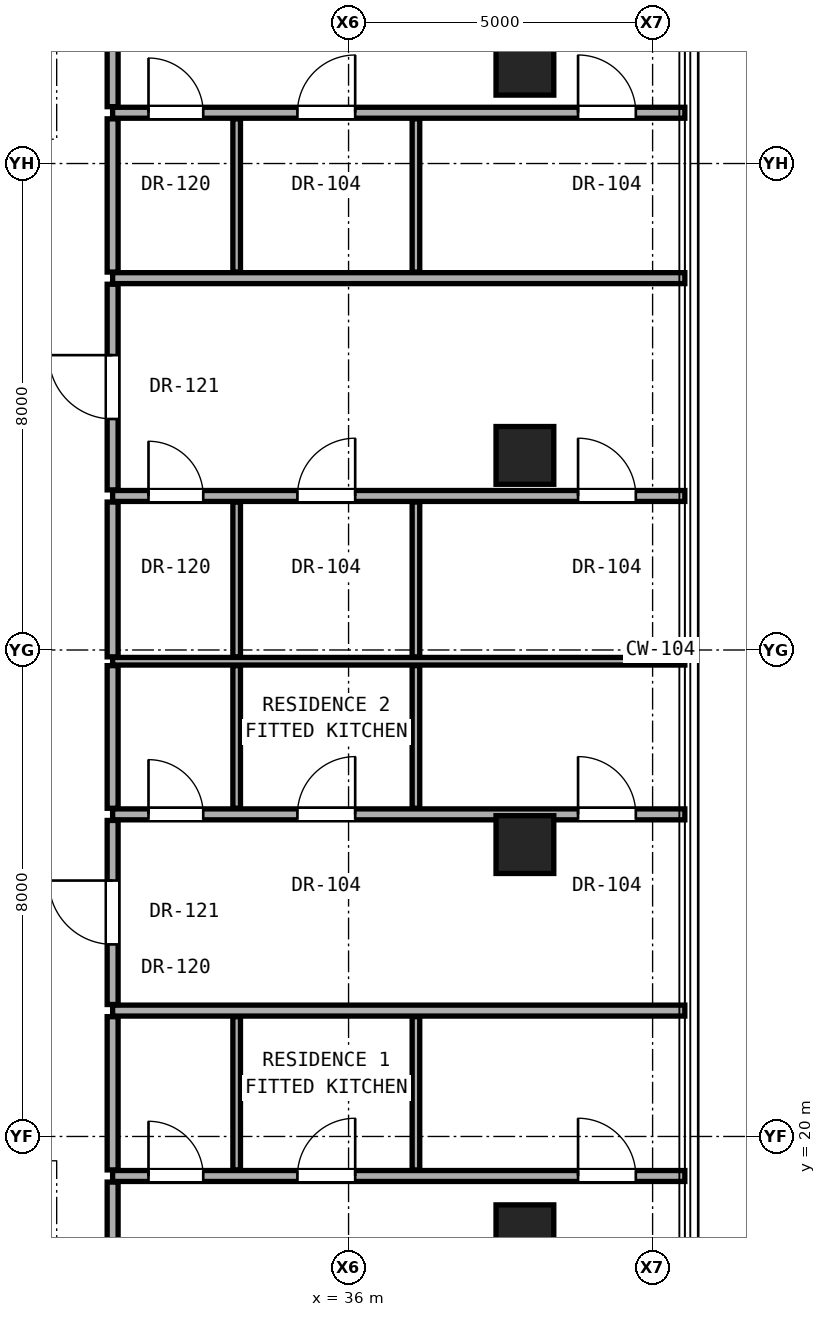
"""IFC4 building model, lengths in metres.
Left out: names, types, materials, properties, quantities, classifications, styles, units other than length and angle.
Written with IfcOpenShell. Run it as: python <this file> out.ifc"""

import sys

from ifc_helpers import new_model, si_unit, direction, frame, frame_2d, origin, origin_2d, place, context, subcontext, project, spatial, rectangle, hollow_rectangle, extrude, element, fill, save


model = new_model("IFC4")
c1 = context("Model", 3, precision=1e-05, world=origin(), true_north=direction((0.0, 1.0)))
c2 = subcontext(c1, "Body", "Model", "MODEL_VIEW")
j1 = project(units=[si_unit("LENGTHUNIT", "METRE"), si_unit("PLANEANGLEUNIT", "RADIAN")], contexts=[c1])
p1 = place(None, origin())
s1 = spatial("IfcSite", under=j1, at=p1, CompositionType="ELEMENT")
p2 = place(p1, origin())
s2 = spatial("IfcBuilding", under=s1, at=p2, CompositionType="ELEMENT")
p3 = place(p2, frame((0.0, 0.0, 170.65)))
s3 = spatial("IfcBuildingStorey", under=s2, at=p3, CompositionType="ELEMENT", Elevation=170.65)
for number, where, z_axis, x_axis in (
    (1, (38.9, 18.4, 0.0), (0.0, 0.0, 1.0), (1.0, 0.0, 0.0)),
    (2, (38.9, 24.8, 0.0), (0.0, 0.0, 1.0), (1.0, 0.0, 0.0)),
    (3, (38.9, 31.2, 0.0), (0.0, 0.0, 1.0), (1.0, 0.0, 0.0)),
    (4, (38.9, 37.6, 0.0), (0.0, 0.0, 1.0), (1.0, 0.0, 0.0)),
):
    element("IfcColumn", number, at=place(p3, frame(where, z_axis=z_axis, x_axis=x_axis)), inside=s3, PredefinedType="COLUMN", context=c2, shape_type="SweptSolid", body=[
        extrude(hollow_rectangle(XDim=0.95, YDim=0.95, WallThickness=0.05, at=origin_2d()), origin(), (0.0, 0.0, 1.0), 3.25),
    ])
p4 = place(p3, frame((32.12, 19.35, 0.0), z_axis=(0.0, 0.0, 1.0), x_axis=(1.0, 0.0, 0.0)))
e5 = element("IfcWall", 5, at=p4, inside=s3, PredefinedType="PARTITIONING", context=c2, shape_type="SweptSolid", body=[
    extrude(rectangle(XDim=9.41, YDim=0.18, at=frame_2d((4.705, 0.0))), origin(), (0.0, 0.0, 1.0), 2.269),
])
p5 = place(p4, frame((7.654, 0.0, 0.0)))
e6 = element("IfcOpeningElement", 6, at=p5, cuts=e5, PredefinedType="OPENING", context=c2, shape_type="SweptSolid", body=[
    extrude(rectangle(XDim=0.95, YDim=2.15, at=frame_2d((0.475, 1.075))), frame((0.0, 0.1, 0.0), z_axis=(0.0, -1.0, 0.0), x_axis=(1.0, 0.0, 0.0)), (0.0, 0.0, 1.0), 0.2),
])
p6 = place(p4, frame((3.039, 0.0, 0.0)))
e7 = element("IfcOpeningElement", 7, at=p6, cuts=e5, PredefinedType="OPENING", context=c2, shape_type="SweptSolid", body=[
    extrude(rectangle(XDim=0.95, YDim=2.15, at=frame_2d((0.475, 1.075))), frame((0.0, 0.1, 0.0), z_axis=(0.0, -1.0, 0.0), x_axis=(1.0, 0.0, 0.0)), (0.0, 0.0, 1.0), 0.2),
])
p7 = place(p4, frame((0.59, 0.0, 0.0)))
e8 = element("IfcOpeningElement", 8, at=p7, cuts=e5, PredefinedType="OPENING", context=c2, shape_type="SweptSolid", body=[
    extrude(rectangle(XDim=0.9, YDim=2.1, at=frame_2d((0.45, 1.05))), frame((0.0, 0.1, 0.0), z_axis=(0.0, -1.0, 0.0), x_axis=(1.0, 0.0, 0.0)), (0.0, 0.0, 1.0), 0.2),
])
p8 = place(p3, frame((32.12, 22.07, 0.0), z_axis=(0.0, 0.0, 1.0), x_axis=(1.0, 0.0, 0.0)))
e9 = element("IfcWall", 9, at=p8, inside=s3, PredefinedType="PARTITIONING", context=c2, shape_type="SweptSolid", body=[
    extrude(rectangle(XDim=9.41, YDim=0.18, at=frame_2d((4.705, 0.0))), origin(), (0.0, 0.0, 1.0), 2.269),
])
p9 = place(p3, frame((32.12, 25.297, 0.0), z_axis=(0.0, 0.0, 1.0), x_axis=(1.0, 0.0, 0.0)))
e10 = element("IfcWall", 10, at=p9, inside=s3, PredefinedType="PARTITIONING", context=c2, shape_type="SweptSolid", body=[
    extrude(rectangle(XDim=9.41, YDim=0.18, at=frame_2d((4.705, 0.0))), origin(), (0.0, 0.0, 1.0), 2.269),
])
p10 = place(p9, frame((7.654, 0.0, 0.0)))
e11 = element("IfcOpeningElement", 11, at=p10, cuts=e10, PredefinedType="OPENING", context=c2, shape_type="SweptSolid", body=[
    extrude(rectangle(XDim=0.95, YDim=2.15, at=frame_2d((0.475, 1.075))), frame((0.0, 0.1, 0.0), z_axis=(0.0, -1.0, 0.0), x_axis=(1.0, 0.0, 0.0)), (0.0, 0.0, 1.0), 0.2),
])
p11 = place(p9, frame((3.039, 0.0, 0.0)))
e12 = element("IfcOpeningElement", 12, at=p11, cuts=e10, PredefinedType="OPENING", context=c2, shape_type="SweptSolid", body=[
    extrude(rectangle(XDim=0.95, YDim=2.15, at=frame_2d((0.475, 1.075))), frame((0.0, 0.1, 0.0), z_axis=(0.0, -1.0, 0.0), x_axis=(1.0, 0.0, 0.0)), (0.0, 0.0, 1.0), 0.2),
])
p12 = place(p9, frame((0.59, 0.0, 0.0)))
e13 = element("IfcOpeningElement", 13, at=p12, cuts=e10, PredefinedType="OPENING", context=c2, shape_type="SweptSolid", body=[
    extrude(rectangle(XDim=0.9, YDim=2.1, at=frame_2d((0.45, 1.05))), frame((0.0, 0.1, 0.0), z_axis=(0.0, -1.0, 0.0), x_axis=(1.0, 0.0, 0.0)), (0.0, 0.0, 1.0), 0.2),
])
p13 = place(p3, frame((32.12, 27.815, 0.0), z_axis=(0.0, 0.0, 1.0), x_axis=(1.0, 0.0, 0.0)))
e14 = element("IfcWall", 14, at=p13, inside=s3, PredefinedType="PARTITIONING", context=c2, shape_type="SweptSolid", body=[
    extrude(rectangle(XDim=9.41, YDim=0.125, at=frame_2d((4.705, 0.0))), origin(), (0.0, 0.0, 1.0), 2.269),
])
p14 = place(p3, frame((32.12, 30.533, 0.0), z_axis=(0.0, 0.0, 1.0), x_axis=(1.0, 0.0, 0.0)))
e15 = element("IfcWall", 15, at=p14, inside=s3, PredefinedType="PARTITIONING", context=c2, shape_type="SweptSolid", body=[
    extrude(rectangle(XDim=9.41, YDim=0.18, at=frame_2d((4.705, 0.0))), origin(), (0.0, 0.0, 1.0), 2.269),
])
p15 = place(p14, frame((7.654, 0.0, 0.0)))
e16 = element("IfcOpeningElement", 16, at=p15, cuts=e15, PredefinedType="OPENING", context=c2, shape_type="SweptSolid", body=[
    extrude(rectangle(XDim=0.95, YDim=2.15, at=frame_2d((0.475, 1.075))), frame((0.0, 0.1, 0.0), z_axis=(0.0, -1.0, 0.0), x_axis=(1.0, 0.0, 0.0)), (0.0, 0.0, 1.0), 0.2),
])
p16 = place(p14, frame((3.039, 0.0, 0.0)))
e17 = element("IfcOpeningElement", 17, at=p16, cuts=e15, PredefinedType="OPENING", context=c2, shape_type="SweptSolid", body=[
    extrude(rectangle(XDim=0.95, YDim=2.15, at=frame_2d((0.475, 1.075))), frame((0.0, 0.1, 0.0), z_axis=(0.0, -1.0, 0.0), x_axis=(1.0, 0.0, 0.0)), (0.0, 0.0, 1.0), 0.2),
])
p17 = place(p14, frame((0.59, 0.0, 0.0)))
e18 = element("IfcOpeningElement", 18, at=p17, cuts=e15, PredefinedType="OPENING", context=c2, shape_type="SweptSolid", body=[
    extrude(rectangle(XDim=0.9, YDim=2.1, at=frame_2d((0.45, 1.05))), frame((0.0, 0.1, 0.0), z_axis=(0.0, -1.0, 0.0), x_axis=(1.0, 0.0, 0.0)), (0.0, 0.0, 1.0), 0.2),
])
p18 = place(p3, frame((32.12, 34.115, 0.0), z_axis=(0.0, 0.0, 1.0), x_axis=(1.0, 0.0, 0.0)))
e19 = element("IfcWall", 19, at=p18, inside=s3, PredefinedType="PARTITIONING", context=c2, shape_type="SweptSolid", body=[
    extrude(rectangle(XDim=9.41, YDim=0.18, at=frame_2d((4.705, 0.0))), origin(), (0.0, 0.0, 1.0), 2.269),
])
p19 = place(p3, frame((32.12, 36.835, 0.0), z_axis=(0.0, 0.0, 1.0), x_axis=(1.0, 0.0, 0.0)))
e20 = element("IfcWall", 20, at=p19, inside=s3, PredefinedType="PARTITIONING", context=c2, shape_type="SweptSolid", body=[
    extrude(rectangle(XDim=9.41, YDim=0.18, at=frame_2d((4.705, 0.0))), origin(), (0.0, 0.0, 1.0), 2.269),
])
p20 = place(p19, frame((7.654, 0.0, 0.0)))
e21 = element("IfcOpeningElement", 21, at=p20, cuts=e20, PredefinedType="OPENING", context=c2, shape_type="SweptSolid", body=[
    extrude(rectangle(XDim=0.95, YDim=2.15, at=frame_2d((0.475, 1.075))), frame((0.0, 0.1, 0.0), z_axis=(0.0, -1.0, 0.0), x_axis=(1.0, 0.0, 0.0)), (0.0, 0.0, 1.0), 0.2),
])
p21 = place(p19, frame((3.039, 0.0, 0.0)))
e22 = element("IfcOpeningElement", 22, at=p21, cuts=e20, PredefinedType="OPENING", context=c2, shape_type="SweptSolid", body=[
    extrude(rectangle(XDim=0.95, YDim=2.15, at=frame_2d((0.475, 1.075))), frame((0.0, 0.1, 0.0), z_axis=(0.0, -1.0, 0.0), x_axis=(1.0, 0.0, 0.0)), (0.0, 0.0, 1.0), 0.2),
])
p22 = place(p19, frame((0.59, 0.0, 0.0)))
e23 = element("IfcOpeningElement", 23, at=p22, cuts=e20, PredefinedType="OPENING", context=c2, shape_type="SweptSolid", body=[
    extrude(rectangle(XDim=0.9, YDim=2.1, at=frame_2d((0.45, 1.05))), frame((0.0, 0.1, 0.0), z_axis=(0.0, -1.0, 0.0), x_axis=(1.0, 0.0, 0.0)), (0.0, 0.0, 1.0), 0.2),
])
p23 = place(p3, frame((32.12, 14.685, 0.0), z_axis=(0.0, 0.0, 1.0), x_axis=(0.0, 1.0, 0.0)))
e24 = element("IfcWall", 24, at=p23, inside=s3, PredefinedType="PARTITIONING", context=c2, shape_type="SweptSolid", body=[
    extrude(rectangle(XDim=4.565, YDim=0.18, at=frame_2d((2.282, 0.0))), origin(), (0.0, 0.0, 1.0), 2.442),
])
p24 = place(p23, frame((2.058, 0.0, 0.0)))
e25 = element("IfcOpeningElement", 25, at=p24, cuts=e24, PredefinedType="OPENING", context=c2, shape_type="SweptSolid", body=[
    extrude(rectangle(XDim=1.05, YDim=2.2, at=frame_2d((0.525, 1.1))), frame((0.0, 0.1, 0.0), z_axis=(0.0, -1.0, 0.0), x_axis=(1.0, 0.0, 0.0)), (0.0, 0.0, 1.0), 0.2),
])
p25 = place(p3, frame((32.12, 19.45, 0.0), z_axis=(0.0, 0.0, 1.0), x_axis=(0.0, 1.0, 0.0)))
e26 = element("IfcWall", 26, at=p25, inside=s3, PredefinedType="PARTITIONING", context=c2, shape_type="SweptSolid", body=[
    extrude(rectangle(XDim=2.52, YDim=0.18, at=frame_2d((1.26, 0.0))), origin(), (0.0, 0.0, 1.0), 3.05),
])
p26 = place(p3, frame((32.12, 22.17, 0.0), z_axis=(0.0, 0.0, 1.0), x_axis=(0.0, 1.0, 0.0)))
e27 = element("IfcWall", 27, at=p26, inside=s3, PredefinedType="PARTITIONING", context=c2, shape_type="SweptSolid", body=[
    extrude(rectangle(XDim=3.027, YDim=0.18, at=frame_2d((1.514, 0.0))), origin(), (0.0, 0.0, 1.0), 2.346),
])
p27 = place(p26, frame((0.989, 0.0, 0.0)))
e28 = element("IfcOpeningElement", 28, at=p27, cuts=e27, PredefinedType="OPENING", context=c2, shape_type="SweptSolid", body=[
    extrude(rectangle(XDim=1.05, YDim=2.2, at=frame_2d((0.525, 1.1))), frame((0.0, 0.1, 0.0), z_axis=(0.0, -1.0, 0.0), x_axis=(1.0, 0.0, 0.0)), (0.0, 0.0, 1.0), 0.2),
])
p28 = place(p3, frame((32.12, 25.397, 0.0), z_axis=(0.0, 0.0, 1.0), x_axis=(0.0, 1.0, 0.0)))
e29 = element("IfcWall", 29, at=p28, inside=s3, PredefinedType="PARTITIONING", context=c2, shape_type="SweptSolid", body=[
    extrude(rectangle(XDim=2.345, YDim=0.18, at=frame_2d((1.173, 0.0))), origin(), (0.0, 0.0, 1.0), 3.05),
])
p29 = place(p3, frame((32.12, 27.887, 0.0), z_axis=(0.0, 0.0, 1.0), x_axis=(0.0, 1.0, 0.0)))
e30 = element("IfcWall", 30, at=p29, inside=s3, PredefinedType="PARTITIONING", context=c2, shape_type="SweptSolid", body=[
    extrude(rectangle(XDim=2.546, YDim=0.18, at=frame_2d((1.273, 0.0))), origin(), (0.0, 0.0, 1.0), 3.05),
])
p30 = place(p3, frame((32.12, 30.633, 0.0), z_axis=(0.0, 0.0, 1.0), x_axis=(0.0, 1.0, 0.0)))
e31 = element("IfcWall", 31, at=p30, inside=s3, PredefinedType="PARTITIONING", context=c2, shape_type="SweptSolid", body=[
    extrude(rectangle(XDim=3.382, YDim=0.18, at=frame_2d((1.691, 0.0))), origin(), (0.0, 0.0, 1.0), 2.346),
])
p31 = place(p30, frame((1.166, 0.0, 0.0)))
e32 = element("IfcOpeningElement", 32, at=p31, cuts=e31, PredefinedType="OPENING", context=c2, shape_type="SweptSolid", body=[
    extrude(rectangle(XDim=1.05, YDim=2.2, at=frame_2d((0.525, 1.1))), frame((0.0, 0.1, 0.0), z_axis=(0.0, -1.0, 0.0), x_axis=(1.0, 0.0, 0.0)), (0.0, 0.0, 1.0), 0.2),
])
p32 = place(p3, frame((32.12, 34.215, 0.0), z_axis=(0.0, 0.0, 1.0), x_axis=(0.0, 1.0, 0.0)))
e33 = element("IfcWall", 33, at=p32, inside=s3, PredefinedType="PARTITIONING", context=c2, shape_type="SweptSolid", body=[
    extrude(rectangle(XDim=2.52, YDim=0.18, at=frame_2d((1.26, 0.0))), origin(), (0.0, 0.0, 1.0), 3.05),
])
p33 = place(p3, frame((32.12, 36.935, 0.0), z_axis=(0.0, 0.0, 1.0), x_axis=(0.0, 1.0, 0.0)))
e34 = element("IfcWall", 34, at=p33, inside=s3, PredefinedType="PARTITIONING", context=c2, shape_type="SweptSolid", body=[
    extrude(rectangle(XDim=4.38, YDim=0.18, at=frame_2d((2.19, 0.0))), origin(), (0.0, 0.0, 1.0), 2.442),
])
p34 = place(p33, frame((1.365, 0.0, 0.0)))
e35 = element("IfcOpeningElement", 35, at=p34, cuts=e34, PredefinedType="OPENING", context=c2, shape_type="SweptSolid", body=[
    extrude(rectangle(XDim=1.05, YDim=2.2, at=frame_2d((0.525, 1.1))), frame((0.0, 0.1, 0.0), z_axis=(0.0, -1.0, 0.0), x_axis=(1.0, 0.0, 0.0)), (0.0, 0.0, 1.0), 0.2),
])
p35 = place(p3, frame((34.16, 19.45, 0.0), z_axis=(0.0, 0.0, 1.0), x_axis=(0.0, 1.0, 0.0)))
e36 = element("IfcWall", 36, at=p35, inside=s3, PredefinedType="PARTITIONING", context=c2, shape_type="SweptSolid", body=[
    extrude(rectangle(XDim=2.52, YDim=0.125, at=frame_2d((1.26, 0.0))), origin(), (0.0, 0.0, 1.0), 3.05),
])
p36 = place(p3, frame((34.16, 25.397, 0.0), z_axis=(0.0, 0.0, 1.0), x_axis=(0.0, 1.0, 0.0)))
e37 = element("IfcWall", 37, at=p36, inside=s3, PredefinedType="PARTITIONING", context=c2, shape_type="SweptSolid", body=[
    extrude(rectangle(XDim=2.345, YDim=0.125, at=frame_2d((1.173, 0.0))), origin(), (0.0, 0.0, 1.0), 3.05),
])
p37 = place(p3, frame((34.16, 27.887, 0.0), z_axis=(0.0, 0.0, 1.0), x_axis=(0.0, 1.0, 0.0)))
e38 = element("IfcWall", 38, at=p37, inside=s3, PredefinedType="PARTITIONING", context=c2, shape_type="SweptSolid", body=[
    extrude(rectangle(XDim=2.546, YDim=0.125, at=frame_2d((1.273, 0.0))), origin(), (0.0, 0.0, 1.0), 3.05),
])
for number, where, z_axis, x_axis in (
    (39, (34.16, 34.215, 0.0), (0.0, 0.0, 1.0), (0.0, 1.0, 0.0)),
    (40, (37.108, 19.45, 0.0), (0.0, 0.0, 1.0), (0.0, 1.0, 0.0)),
):
    element("IfcWall", number, at=place(p3, frame(where, z_axis=z_axis, x_axis=x_axis)), inside=s3, PredefinedType="PARTITIONING", context=c2, shape_type="SweptSolid", body=[
        extrude(rectangle(XDim=2.52, YDim=0.125, at=frame_2d((1.26, 0.0))), origin(), (0.0, 0.0, 1.0), 3.05),
    ])
p38 = place(p3, frame((37.108, 25.397, 0.0), z_axis=(0.0, 0.0, 1.0), x_axis=(0.0, 1.0, 0.0)))
e41 = element("IfcWall", 41, at=p38, inside=s3, PredefinedType="PARTITIONING", context=c2, shape_type="SweptSolid", body=[
    extrude(rectangle(XDim=2.345, YDim=0.125, at=frame_2d((1.173, 0.0))), origin(), (0.0, 0.0, 1.0), 3.05),
])
p39 = place(p3, frame((37.108, 27.887, 0.0), z_axis=(0.0, 0.0, 1.0), x_axis=(0.0, 1.0, 0.0)))
e42 = element("IfcWall", 42, at=p39, inside=s3, PredefinedType="PARTITIONING", context=c2, shape_type="SweptSolid", body=[
    extrude(rectangle(XDim=2.546, YDim=0.125, at=frame_2d((1.273, 0.0))), origin(), (0.0, 0.0, 1.0), 3.05),
])
p40 = place(p3, frame((37.108, 34.215, 0.0), z_axis=(0.0, 0.0, 1.0), x_axis=(0.0, 1.0, 0.0)))
e43 = element("IfcWall", 43, at=p40, inside=s3, PredefinedType="PARTITIONING", context=c2, shape_type="SweptSolid", body=[
    extrude(rectangle(XDim=2.52, YDim=0.125, at=frame_2d((1.26, 0.0))), origin(), (0.0, 0.0, 1.0), 3.05),
])
p41 = place(p5, origin())
e44 = element("IfcDoor", 44, at=p41, inside=s3, OperationType="SINGLE_SWING_LEFT", PredefinedType="DOOR", context=c2, shape_type="SweptSolid", body=[
    extrude(rectangle(XDim=0.95, YDim=2.15, at=frame_2d((0.475, 1.075))), frame((0.0, 0.025, 0.0), z_axis=(0.0, -1.0, 0.0), x_axis=(1.0, 0.0, 0.0)), (0.0, 0.0, 1.0), 0.05),
])
fill(e6, e44)
p42 = place(p6, origin())
e45 = element("IfcDoor", 45, at=p42, inside=s3, OperationType="SINGLE_SWING_RIGHT", PredefinedType="DOOR", context=c2, shape_type="SweptSolid", body=[
    extrude(rectangle(XDim=0.95, YDim=2.15, at=frame_2d((0.475, 1.075))), frame((0.0, 0.025, 0.0), z_axis=(0.0, -1.0, 0.0), x_axis=(1.0, 0.0, 0.0)), (0.0, 0.0, 1.0), 0.05),
])
fill(e7, e45)
p43 = place(p7, origin())
e46 = element("IfcDoor", 46, at=p43, inside=s3, OperationType="SINGLE_SWING_LEFT", PredefinedType="DOOR", context=c2, shape_type="SweptSolid", body=[
    extrude(rectangle(XDim=0.9, YDim=2.1, at=frame_2d((0.45, 1.05))), frame((0.0, 0.025, 0.0), z_axis=(0.0, -1.0, 0.0), x_axis=(1.0, 0.0, 0.0)), (0.0, 0.0, 1.0), 0.05),
])
fill(e8, e46)
p44 = place(p27, origin())
e47 = element("IfcDoor", 47, at=p44, inside=s3, OperationType="SINGLE_SWING_RIGHT", PredefinedType="DOOR", context=c2, shape_type="SweptSolid", body=[
    extrude(rectangle(XDim=1.05, YDim=2.2, at=frame_2d((0.525, 1.1))), frame((0.0, 0.025, 0.0), z_axis=(0.0, -1.0, 0.0), x_axis=(1.0, 0.0, 0.0)), (0.0, 0.0, 1.0), 0.05),
])
fill(e28, e47)
p45 = place(p10, origin())
e48 = element("IfcDoor", 48, at=p45, inside=s3, OperationType="SINGLE_SWING_LEFT", PredefinedType="DOOR", context=c2, shape_type="SweptSolid", body=[
    extrude(rectangle(XDim=0.95, YDim=2.15, at=frame_2d((0.475, 1.075))), frame((0.0, 0.025, 0.0), z_axis=(0.0, -1.0, 0.0), x_axis=(1.0, 0.0, 0.0)), (0.0, 0.0, 1.0), 0.05),
])
fill(e11, e48)
p46 = place(p11, origin())
e49 = element("IfcDoor", 49, at=p46, inside=s3, OperationType="SINGLE_SWING_RIGHT", PredefinedType="DOOR", context=c2, shape_type="SweptSolid", body=[
    extrude(rectangle(XDim=0.95, YDim=2.15, at=frame_2d((0.475, 1.075))), frame((0.0, 0.025, 0.0), z_axis=(0.0, -1.0, 0.0), x_axis=(1.0, 0.0, 0.0)), (0.0, 0.0, 1.0), 0.05),
])
fill(e12, e49)
p47 = place(p12, origin())
e50 = element("IfcDoor", 50, at=p47, inside=s3, OperationType="SINGLE_SWING_LEFT", PredefinedType="DOOR", context=c2, shape_type="SweptSolid", body=[
    extrude(rectangle(XDim=0.9, YDim=2.1, at=frame_2d((0.45, 1.05))), frame((0.0, 0.025, 0.0), z_axis=(0.0, -1.0, 0.0), x_axis=(1.0, 0.0, 0.0)), (0.0, 0.0, 1.0), 0.05),
])
fill(e13, e50)
p48 = place(p31, origin())
e51 = element("IfcDoor", 51, at=p48, inside=s3, OperationType="SINGLE_SWING_RIGHT", PredefinedType="DOOR", context=c2, shape_type="SweptSolid", body=[
    extrude(rectangle(XDim=1.05, YDim=2.2, at=frame_2d((0.525, 1.1))), frame((0.0, 0.025, 0.0), z_axis=(0.0, -1.0, 0.0), x_axis=(1.0, 0.0, 0.0)), (0.0, 0.0, 1.0), 0.05),
])
fill(e32, e51)
p49 = place(p15, origin())
e52 = element("IfcDoor", 52, at=p49, inside=s3, OperationType="SINGLE_SWING_LEFT", PredefinedType="DOOR", context=c2, shape_type="SweptSolid", body=[
    extrude(rectangle(XDim=0.95, YDim=2.15, at=frame_2d((0.475, 1.075))), frame((0.0, 0.025, 0.0), z_axis=(0.0, -1.0, 0.0), x_axis=(1.0, 0.0, 0.0)), (0.0, 0.0, 1.0), 0.05),
])
fill(e16, e52)
p50 = place(p16, origin())
e53 = element("IfcDoor", 53, at=p50, inside=s3, OperationType="SINGLE_SWING_RIGHT", PredefinedType="DOOR", context=c2, shape_type="SweptSolid", body=[
    extrude(rectangle(XDim=0.95, YDim=2.15, at=frame_2d((0.475, 1.075))), frame((0.0, 0.025, 0.0), z_axis=(0.0, -1.0, 0.0), x_axis=(1.0, 0.0, 0.0)), (0.0, 0.0, 1.0), 0.05),
])
fill(e17, e53)
p51 = place(p17, origin())
e54 = element("IfcDoor", 54, at=p51, inside=s3, OperationType="SINGLE_SWING_LEFT", PredefinedType="DOOR", context=c2, shape_type="SweptSolid", body=[
    extrude(rectangle(XDim=0.9, YDim=2.1, at=frame_2d((0.45, 1.05))), frame((0.0, 0.025, 0.0), z_axis=(0.0, -1.0, 0.0), x_axis=(1.0, 0.0, 0.0)), (0.0, 0.0, 1.0), 0.05),
])
fill(e18, e54)
p52 = place(p20, origin())
e55 = element("IfcDoor", 55, at=p52, inside=s3, OperationType="SINGLE_SWING_LEFT", PredefinedType="DOOR", context=c2, shape_type="SweptSolid", body=[
    extrude(rectangle(XDim=0.95, YDim=2.15, at=frame_2d((0.475, 1.075))), frame((0.0, 0.025, 0.0), z_axis=(0.0, -1.0, 0.0), x_axis=(1.0, 0.0, 0.0)), (0.0, 0.0, 1.0), 0.05),
])
fill(e21, e55)
p53 = place(p21, origin())
e56 = element("IfcDoor", 56, at=p53, inside=s3, OperationType="SINGLE_SWING_RIGHT", PredefinedType="DOOR", context=c2, shape_type="SweptSolid", body=[
    extrude(rectangle(XDim=0.95, YDim=2.15, at=frame_2d((0.475, 1.075))), frame((0.0, 0.025, 0.0), z_axis=(0.0, -1.0, 0.0), x_axis=(1.0, 0.0, 0.0)), (0.0, 0.0, 1.0), 0.05),
])
fill(e22, e56)
p54 = place(p22, origin())
e57 = element("IfcDoor", 57, at=p54, inside=s3, OperationType="SINGLE_SWING_LEFT", PredefinedType="DOOR", context=c2, shape_type="SweptSolid", body=[
    extrude(rectangle(XDim=0.9, YDim=2.1, at=frame_2d((0.45, 1.05))), frame((0.0, 0.025, 0.0), z_axis=(0.0, -1.0, 0.0), x_axis=(1.0, 0.0, 0.0)), (0.0, 0.0, 1.0), 0.05),
])
fill(e23, e57)
save(model, sys.argv[1])
